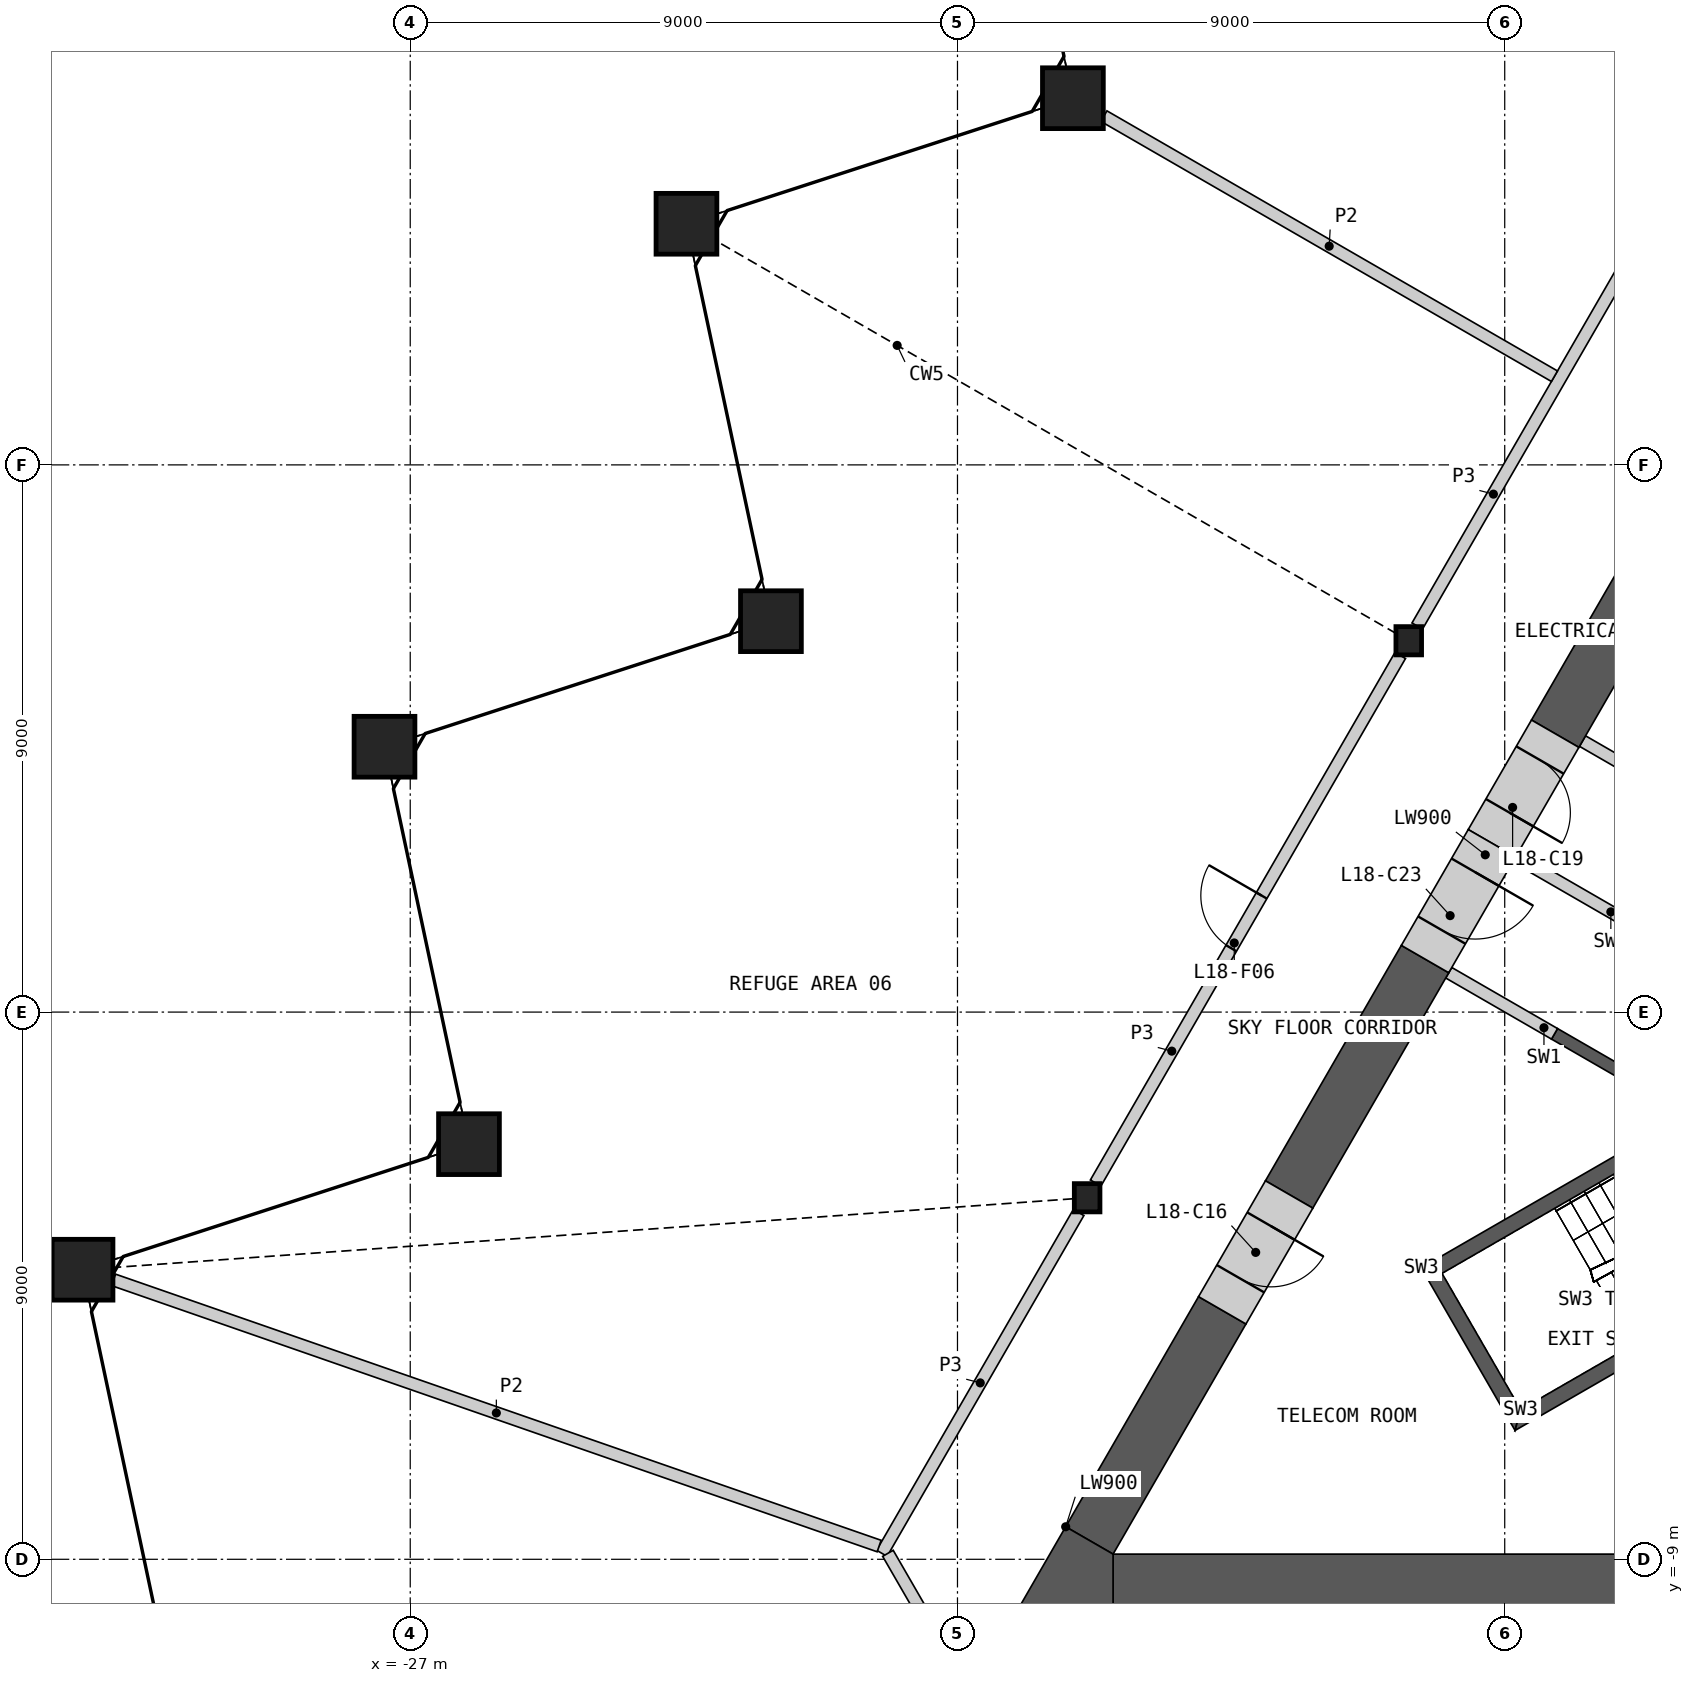
"""IFC4 building model, lengths in metres.
Left out: names, types, materials, properties, quantities, classifications, styles, units other than length and angle.
Written with IfcOpenShell. Run it as: python <this file> out.ifc"""

import sys

from ifc_helpers import new_model, si_unit, direction, frame, frame_2d, origin, origin_2d, place, context, subcontext, project, spatial, polyline, rectangle, hollow_rectangle, i_section, outline, extrude, element, fill, save


model = new_model("IFC4")
c1 = context("Model", 3, precision=1e-05, world=origin(), true_north=direction((0.0, 1.0)))
c2 = subcontext(c1, "Body", "Model", "MODEL_VIEW")
j1 = project(units=[si_unit("LENGTHUNIT", "METRE"), si_unit("PLANEANGLEUNIT", "RADIAN")], contexts=[c1])
p1 = place(None, origin())
s1 = spatial("IfcSite", under=j1, at=p1, CompositionType="ELEMENT")
p2 = place(p1, origin())
s2 = spatial("IfcBuilding", under=s1, at=p2, CompositionType="ELEMENT")
p3 = place(p2, frame((0.0, 0.0, 84.6)))
s3 = spatial("IfcBuildingStorey", under=s2, at=p3, CompositionType="ELEMENT", Elevation=84.6)
for number, where, z_axis, x_axis in (
    (1, (-16.102, 15.031, 0.0), (0.0, 0.0, 1.0), (1.0, 0.0, 0.0)),
    (2, (-22.457, 12.966, 0.0), (0.0, 0.0, 1.0), (1.0, 0.0, 0.0)),
    (3, (-21.068, 6.429, 0.0), (0.0, 0.0, 1.0), (1.0, 0.0, 0.0)),
    (4, (-27.423, 4.364, 0.0), (0.0, 0.0, 1.0), (1.0, 0.0, 0.0)),
    (5, (-26.034, -2.172, 0.0), (0.0, 0.0, 1.0), (1.0, 0.0, 0.0)),
    (6, (-32.389, -4.237, 0.0), (0.0, 0.0, 1.0), (1.0, 0.0, 0.0)),
):
    element("IfcColumn", number, at=place(p3, frame(where, z_axis=z_axis, x_axis=x_axis)), inside=s3, PredefinedType="COLUMN", context=c2, shape_type="SweptSolid", body=[
        extrude(hollow_rectangle(XDim=1.0, YDim=1.0, WallThickness=0.07, at=origin_2d()), origin(), (0.0, 0.0, 1.0), 10.0),
    ])
for number, where, z_axis, x_axis in (
    (7, (-10.578, 6.107, 0.0), (0.0, 0.0, 1.0), (1.0, 0.0, 0.0)),
    (8, (-15.868, -3.054, 0.0), (0.0, 0.0, 1.0), (1.0, 0.0, 0.0)),
):
    element("IfcColumn", number, at=place(p3, frame(where, z_axis=z_axis, x_axis=x_axis)), inside=s3, PredefinedType="COLUMN", context=c2, shape_type="SweptSolid", body=[
        extrude(i_section(OverallWidth=0.421, OverallDepth=0.465, WebThickness=0.045, FlangeThickness=0.072, at=origin_2d()), origin(), (0.0, 0.0, 1.0), 10.0),
    ])
p4 = place(p3, origin())
e9 = element("IfcWall", 9, at=p4, inside=s3, PredefinedType="SHEAR", context=c2, shape_type="SweptSolid", body=[
    extrude(outline(polyline([(-6.061, -1.697), (-8.231, -0.444), (-8.131, -0.271), (-5.96, -1.524), (-6.061, -1.697)])), origin(), (0.0, 0.0, 1.0), 9.6),
])
p5 = place(p3, frame((-5.981, 3.453, 0.0), z_axis=(0.0, 0.0, 1.0), x_axis=(-0.866013584312, 0.500020471368, 0.0)))
e10 = element("IfcWall", 10, at=p5, inside=s3, PredefinedType="SHEAR", context=c2, shape_type="SweptSolid", body=[
    extrude(rectangle(XDim=2.009, YDim=0.2, at=frame_2d((1.005, 0.0))), origin(), (0.0, 0.0, 1.0), 9.6),
])
p6 = place(p3, frame((-7.081, 1.548, 0.0), z_axis=(0.0, 0.0, 1.0), x_axis=(-0.865983199114, 0.50007309351, 0.0)))
e11 = element("IfcWall", 11, at=p6, inside=s3, PredefinedType="SHEAR", context=c2, shape_type="SweptSolid", body=[
    extrude(rectangle(XDim=2.009, YDim=0.2, at=frame_2d((1.004, 0.0))), origin(), (0.0, 0.0, 1.0), 9.6),
])
p7 = place(p3, frame((-8.181, -0.357, 0.0), z_axis=(0.0, 0.0, 1.0), x_axis=(-0.866035824272, 0.499981950752, 0.0)))
e12 = element("IfcWall", 12, at=p7, inside=s3, PredefinedType="SHEAR", context=c2, shape_type="SweptSolid", body=[
    extrude(rectangle(XDim=2.009, YDim=0.2, at=frame_2d((1.004, 0.0))), origin(), (0.0, 0.0, 1.0), 9.6),
])
p8 = place(p3, origin())
e13 = element("IfcWall", 13, at=p8, inside=s3, PredefinedType="SHEAR", context=c2, shape_type="SweptSolid", body=[
    extrude(outline(polyline([(-5.307, -1.281), (-10.374, -4.206), (-10.032, -4.298), (-5.182, -1.498), (-5.307, -1.281)])), origin(), (0.0, 0.0, 1.0), 9.6),
])
p9 = place(p3, origin())
e14 = element("IfcWall", 14, at=p9, inside=s3, PredefinedType="SHEAR", context=c2, shape_type="SweptSolid", body=[
    extrude(outline(polyline([(-10.374, -4.206), (-8.83, -6.881), (-8.738, -6.539), (-10.032, -4.298), (-10.374, -4.206)])), origin(), (0.0, 0.0, 1.0), 9.6),
])
p10 = place(p3, origin())
e15 = element("IfcWall", 15, at=p10, inside=s3, PredefinedType="SHEAR", context=c2, shape_type="SweptSolid", body=[
    extrude(outline(polyline([(-8.738, -6.539), (-8.83, -6.881), (-3.763, -3.956), (-3.888, -3.739), (-8.738, -6.539)])), origin(), (0.0, 0.0, 1.0), 9.6),
])
p11 = place(p3, frame((-15.441, -9.365, 0.0), z_axis=(0.0, 0.0, 1.0), x_axis=(1.0, 0.0, 0.0)))
e16 = element("IfcWall", 16, at=p11, inside=s3, PredefinedType="SHEAR", context=c2, shape_type="SweptSolid", body=[
    extrude(rectangle(XDim=14.341, YDim=0.9, at=frame_2d((7.17, 0.0))), origin(), (0.0, 0.0, 1.0), 9.6),
])
p12 = place(p3, frame((-3.675, 12.365, 0.0), z_axis=(0.0, 0.0, 1.0), x_axis=(-0.500014716158, -0.86601690724, 0.0)))
e17 = element("IfcWall", 17, at=p12, inside=s3, PredefinedType="SHEAR", context=c2, shape_type="SweptSolid", body=[
    extrude(rectangle(XDim=8.99, YDim=0.9, at=frame_2d((4.495, 0.0))), origin(), (0.0, 0.0, 1.0), 9.6),
])
p13 = place(p3, frame((-10.31, 0.872, 0.0), z_axis=(0.0, 0.0, 1.0), x_axis=(-0.499991893987, -0.866030083742, 0.0)))
e18 = element("IfcWall", 18, at=p13, inside=s3, PredefinedType="SHEAR", context=c2, shape_type="SweptSolid", body=[
    extrude(rectangle(XDim=4.471, YDim=0.9, at=frame_2d((2.235, 0.0))), origin(), (0.0, 0.0, 1.0), 9.6),
])
p14 = place(p3, frame((-13.646, -4.905, 0.0), z_axis=(0.0, 0.0, 1.0), x_axis=(-0.499990005186, -0.866031174216, 0.0)))
e19 = element("IfcWall", 19, at=p14, inside=s3, PredefinedType="SHEAR", context=c2, shape_type="SweptSolid", body=[
    extrude(rectangle(XDim=4.371, YDim=0.9, at=frame_2d((2.185, 0.0))), origin(), (0.0, 0.0, 1.0), 9.6),
])
p15 = place(p3, origin())
e20 = element("IfcWall", 20, at=p15, inside=s3, PredefinedType="SHEAR", context=c2, shape_type="SweptSolid", body=[
    extrude(outline(polyline([(-16.221, -8.465), (-15.441, -8.915), (-15.441, -9.815), (-17.0, -9.815), (-16.221, -8.465)])), origin(), (0.0, 0.0, 1.0), 9.6),
])
p16 = place(p3, frame((-12.546, -3.0, 0.0), z_axis=(0.0, 0.0, 1.0), x_axis=(-0.499994660107, -0.866028486751, 0.0)))
e21 = element("IfcWall", 21, at=p16, inside=s3, PredefinedType="SHEAR", context=c2, shape_type="SweptSolid", body=[
    extrude(rectangle(XDim=2.2, YDim=0.9, at=frame_2d((1.1, 0.0))), origin(), (0.0, 0.0, 1.0), 9.6),
])
p17 = place(p16, frame((0.6, 0.0, 0.0)))
e22 = element("IfcOpeningElement", 22, at=p17, cuts=e21, PredefinedType="OPENING", context=c2, shape_type="SweptSolid", body=[
    extrude(rectangle(XDim=1.0, YDim=2.1, at=frame_2d((0.5, 1.05))), frame((0.0, 0.46, 0.0), z_axis=(0.0, -1.0, 0.0), x_axis=(1.0, 0.0, 0.0)), (0.0, 0.0, 1.0), 0.92),
])
p18 = place(p3, frame((-8.17, 4.579, 0.0), z_axis=(0.0, 0.0, 1.0), x_axis=(-0.499888406853, -0.866089822532, 0.0)))
e23 = element("IfcWall", 23, at=p18, inside=s3, PredefinedType="SHEAR", context=c2, shape_type="SweptSolid", body=[
    extrude(rectangle(XDim=2.08, YDim=0.9, at=frame_2d((1.04, 0.0))), origin(), (0.0, 0.0, 1.0), 9.6),
])
p19 = place(p18, frame((0.5, 0.0, 0.0)))
e24 = element("IfcOpeningElement", 24, at=p19, cuts=e23, PredefinedType="OPENING", context=c2, shape_type="SweptSolid", body=[
    extrude(rectangle(XDim=1.0, YDim=2.1, at=frame_2d((0.5, 1.05))), frame((0.0, 0.46, 0.0), z_axis=(0.0, -1.0, 0.0), x_axis=(1.0, 0.0, 0.0)), (0.0, 0.0, 1.0), 0.92),
])
p20 = place(p3, frame((-9.21, 2.777, 0.0), z_axis=(0.0, 0.0, 1.0), x_axis=(-0.500077893725, -0.86598042715, 0.0)))
e25 = element("IfcWall", 25, at=p20, inside=s3, PredefinedType="SHEAR", context=c2, shape_type="SweptSolid", body=[
    extrude(rectangle(XDim=2.2, YDim=0.9, at=frame_2d((1.1, 0.0))), origin(), (0.0, 0.0, 1.0), 9.6),
])
p21 = place(p20, frame((0.55, 0.0, 0.0)))
e26 = element("IfcOpeningElement", 26, at=p21, cuts=e25, PredefinedType="OPENING", context=c2, shape_type="SweptSolid", body=[
    extrude(rectangle(XDim=1.1, YDim=2.1, at=frame_2d((0.55, 1.05))), frame((0.0, 0.46, 0.0), z_axis=(0.0, -1.0, 0.0), x_axis=(1.0, 0.0, 0.0)), (0.0, 0.0, 1.0), 0.92),
])
p22 = place(p3, frame((-10.439, 6.35, 0.0), z_axis=(0.0, 0.0, 1.0), x_axis=(0.50001002959, 0.86601961312, 0.0)))
e27 = element("IfcWall", 27, at=p22, inside=s3, PredefinedType="PARTITIONING", context=c2, shape_type="SweptSolid", body=[
    extrude(rectangle(XDim=10.019, YDim=0.2, at=frame_2d((5.009, 0.0))), origin(), (0.0, 0.0, 1.0), 9.6),
])
p23 = place(p3, frame((-15.728, -2.811, 0.0), z_axis=(0.0, 0.0, 1.0), x_axis=(0.49999175339, 0.866030164915, 0.0)))
e28 = element("IfcWall", 28, at=p23, inside=s3, PredefinedType="PARTITIONING", context=c2, shape_type="SweptSolid", body=[
    extrude(rectangle(XDim=10.019, YDim=0.2, at=frame_2d((5.009, 0.0))), origin(), (0.0, 0.0, 1.0), 9.6),
])
p24 = place(p23, frame((4.459, 0.0, 0.0)))
e29 = element("IfcOpeningElement", 29, at=p24, cuts=e28, PredefinedType="OPENING", context=c2, shape_type="SweptSolid", body=[
    extrude(rectangle(XDim=1.0, YDim=2.1, at=frame_2d((0.5, 1.05))), frame((0.0, 0.11, 0.0), z_axis=(0.0, -1.0, 0.0), x_axis=(1.0, 0.0, 0.0)), (0.0, 0.0, 1.0), 0.22),
])
p25 = place(p3, frame((-19.244, -8.902, 0.0), z_axis=(0.0, 0.0, 1.0), x_axis=(0.499984737558, 0.86603421538, 0.0)))
e30 = element("IfcWall", 30, at=p25, inside=s3, PredefinedType="PARTITIONING", context=c2, shape_type="SweptSolid", body=[
    extrude(rectangle(XDim=6.473, YDim=0.2, at=frame_2d((3.236, 0.0))), origin(), (0.0, 0.0, 1.0), 9.6),
])
p26 = place(p3, frame((-19.144, -8.902, 0.0), z_axis=(0.0, 0.0, 1.0), x_axis=(0.499958791762, -0.866049194065, 0.0)))
e31 = element("IfcWall", 31, at=p26, inside=s3, PredefinedType="PARTITIONING", context=c2, shape_type="SweptSolid", body=[
    extrude(rectangle(XDim=3.726, YDim=0.2, at=frame_2d((1.863, 0.0))), origin(), (0.0, 0.0, 1.0), 9.6),
])
p27 = place(p3, frame((-31.879, -4.405, 0.0), z_axis=(0.0, 0.0, 1.0), x_axis=(0.944544719933, -0.328382813263, 0.0)))
e32 = element("IfcWall", 32, at=p27, inside=s3, PredefinedType="PARTITIONING", context=c2, shape_type="SweptSolid", body=[
    extrude(rectangle(XDim=13.33, YDim=0.2, at=frame_2d((6.665, 0.0))), origin(), (0.0, 0.0, 1.0), 8.685),
])
p28 = place(p3, frame((-15.592, 14.736, 0.0), z_axis=(0.0, 0.0, 1.0), x_axis=(0.866039711517, -0.499975217462, 0.0)))
e33 = element("IfcWall", 33, at=p28, inside=s3, PredefinedType="PARTITIONING", context=c2, shape_type="SweptSolid", body=[
    extrude(rectangle(XDim=8.556, YDim=0.2, at=frame_2d((4.278, 0.0))), origin(), (0.0, 0.0, 1.0), 8.685),
])
p29 = place(p17, origin())
e34 = element("IfcDoor", 34, at=p29, inside=s3, OperationType="SINGLE_SWING_LEFT", PredefinedType="DOOR", context=c2, shape_type="SweptSolid", body=[
    extrude(rectangle(XDim=1.0, YDim=2.1, at=frame_2d((0.5, 1.05))), frame((0.0, 0.205, 0.0), z_axis=(0.0, -1.0, 0.0), x_axis=(1.0, 0.0, 0.0)), (0.0, 0.0, 1.0), 0.05),
])
fill(e22, e34)
p30 = place(p19, origin())
e35 = element("IfcDoor", 35, at=p30, inside=s3, OperationType="SINGLE_SWING_RIGHT", PredefinedType="DOOR", context=c2, shape_type="SweptSolid", body=[
    extrude(rectangle(XDim=1.0, YDim=2.1, at=frame_2d((0.5, 1.05))), frame((0.0, 0.205, 0.0), z_axis=(0.0, -1.0, 0.0), x_axis=(1.0, 0.0, 0.0)), (0.0, 0.0, 1.0), 0.05),
])
fill(e24, e35)
p31 = place(p21, origin())
e36 = element("IfcDoor", 36, at=p31, inside=s3, OperationType="SINGLE_SWING_LEFT", PredefinedType="DOOR", context=c2, shape_type="SweptSolid", body=[
    extrude(rectangle(XDim=1.1, YDim=2.1, at=frame_2d((0.55, 1.05))), frame((0.0, 0.205, 0.0), z_axis=(0.0, -1.0, 0.0), x_axis=(1.0, 0.0, 0.0)), (0.0, 0.0, 1.0), 0.05),
])
fill(e26, e36)
p32 = place(p24, origin())
e37 = element("IfcDoor", 37, at=p32, inside=s3, OperationType="SINGLE_SWING_RIGHT", PredefinedType="DOOR", context=c2, shape_type="SweptSolid", body=[
    extrude(rectangle(XDim=1.0, YDim=2.1, at=frame_2d((0.5, 1.05))), frame((0.0, 0.025, 0.0), z_axis=(0.0, -1.0, 0.0), x_axis=(1.0, 0.0, 0.0)), (0.0, 0.0, 1.0), 0.05),
])
fill(e29, e37)
save(model, sys.argv[1])
